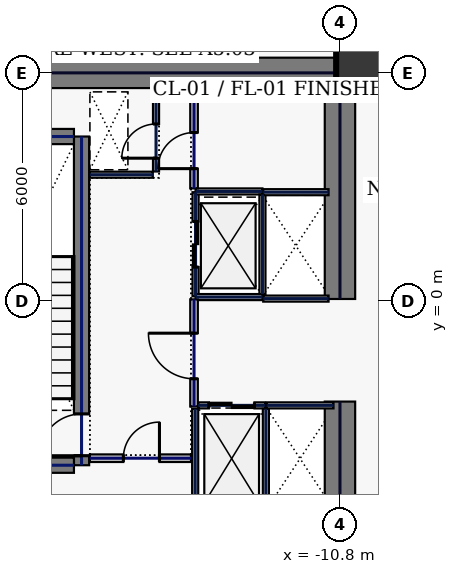
"""IFC4 building model, lengths in metres.
Left out: names, types, materials, properties, quantities, classifications, styles, units other than length and angle.
Written with IfcOpenShell. Run it as: python <this file> out.ifc"""

import sys

from ifc_helpers import new_model, si_unit, direction, frame, frame_2d, origin, origin_2d, place, context, subcontext, project, spatial, rectangle, hollow_rectangle, extrude, element, fill, save


model = new_model("IFC4")
c1 = context("Model", 3, precision=1e-05, world=origin(), true_north=direction((0.0, 1.0)))
c2 = subcontext(c1, "Body", "Model", "MODEL_VIEW")
j1 = project(units=[si_unit("LENGTHUNIT", "METRE"), si_unit("PLANEANGLEUNIT", "RADIAN")], contexts=[c1])
p1 = place(None, origin())
s1 = spatial("IfcSite", under=j1, at=p1, CompositionType="ELEMENT")
p2 = place(p1, origin())
s2 = spatial("IfcBuilding", under=s1, at=p2, CompositionType="ELEMENT")
p3 = place(p2, frame((0.0, 0.0, 67.4)))
s3 = spatial("IfcBuildingStorey", under=s2, at=p3, CompositionType="ELEMENT", Elevation=67.4)
p4 = place(p3, frame((-22.0, 6.0, 0.0), z_axis=(0.0, 0.0, 1.0), x_axis=(1.0, 0.0, 0.0)))
e1 = element("IfcWall", 1, at=p4, inside=s3, PredefinedType="SHEAR", context=c2, shape_type="SweptSolid", body=[
    extrude(rectangle(XDim=11.6, YDim=0.8, at=frame_2d((5.8, 0.0))), origin(), (0.0, 0.0, 1.0), 3.74),
])
p5 = place(p3, frame((-10.8, -5.6, 0.0), z_axis=(0.0, 0.0, 1.0), x_axis=(0.0, 1.0, 0.0)))
e2 = element("IfcWall", 2, at=p5, inside=s3, PredefinedType="SHEAR", context=c2, shape_type="SweptSolid", body=[
    extrude(rectangle(XDim=2.95, YDim=0.8, at=frame_2d((1.475, 0.0))), origin(), (0.0, 0.0, 1.0), 3.74),
])
p6 = place(p3, frame((-10.8, 0.05, 0.0), z_axis=(0.0, 0.0, 1.0), x_axis=(0.0, 1.0, 0.0)))
e3 = element("IfcWall", 3, at=p6, inside=s3, PredefinedType="SHEAR", context=c2, shape_type="SweptSolid", body=[
    extrude(rectangle(XDim=5.55, YDim=0.8, at=frame_2d((2.775, 0.0))), origin(), (0.0, 0.0, 1.0), 3.74),
])
p7 = place(p3, frame((-17.6, -4.325, 0.0), z_axis=(0.0, 0.0, 1.0), x_axis=(0.0, 1.0, 0.0)))
e4 = element("IfcWall", 4, at=p7, inside=s3, PredefinedType="SHEAR", context=c2, shape_type="SweptSolid", body=[
    extrude(rectangle(XDim=8.65, YDim=0.4, at=frame_2d((4.325, 0.0))), origin(), (0.0, 0.0, 1.0), 3.74),
])
p8 = place(p7, frame((0.25, 0.0, 0.0)))
e5 = element("IfcOpeningElement", 5, at=p8, cuts=e4, PredefinedType="OPENING", context=c2, shape_type="SweptSolid", body=[
    extrude(rectangle(XDim=1.1, YDim=2.2, at=frame_2d((0.55, 1.1))), frame((0.0, 0.21, 0.0), z_axis=(0.0, -1.0, 0.0), x_axis=(1.0, 0.0, 0.0)), (0.0, 0.0, 1.0), 0.42),
])
for number, where, z_axis, x_axis in (
    (6, (-21.2, -4.325, 0.0), (0.0, 0.0, 1.0), (1.0, 0.0, 0.0)),
    (7, (-21.2, 4.325, 0.0), (0.0, 0.0, 1.0), (1.0, 0.0, 0.0)),
):
    element("IfcWall", number, at=place(p3, frame(where, z_axis=z_axis, x_axis=x_axis)), inside=s3, PredefinedType="SHEAR", context=c2, shape_type="SweptSolid", body=[
        extrude(rectangle(XDim=3.4, YDim=0.4, at=frame_2d((1.7, 0.0))), origin(), (0.0, 0.0, 1.0), 3.74),
    ])
p9 = place(p3, frame((-10.3, 6.35, 0.0), z_axis=(0.0, 0.0, 1.0), x_axis=(1.0, 0.0, 0.0)))
e8 = element("IfcColumn", 8, at=p9, inside=s3, PredefinedType="COLUMN", context=c2, shape_type="SweptSolid", body=[
    extrude(hollow_rectangle(XDim=1.2, YDim=1.2, WallThickness=0.05, at=origin_2d()), origin(), (0.0, 0.0, 1.0), 3.74),
])
p10 = place(p3, frame((-14.6, 0.12, 0.0), z_axis=(0.0, 0.0, 1.0), x_axis=(0.0, 1.0, 0.0)))
e9 = element("IfcWall", 9, at=p10, inside=s3, PredefinedType="PARTITIONING", context=c2, shape_type="SweptSolid", body=[
    extrude(rectangle(XDim=2.74, YDim=0.16, at=frame_2d((1.37, 0.0))), origin(), (0.0, 0.0, 1.0), 3.74),
])
p11 = place(p10, frame((0.77, 0.0, 0.0)))
e10 = element("IfcOpeningElement", 10, at=p11, cuts=e9, PredefinedType="OPENING", context=c2, shape_type="SweptSolid", body=[
    extrude(rectangle(XDim=1.2, YDim=2.2, at=frame_2d((0.6, 1.1))), frame((0.0, 0.09, 0.0), z_axis=(0.0, -1.0, 0.0), x_axis=(1.0, 0.0, 0.0)), (0.0, 0.0, 1.0), 0.18),
])
for number, where, z_axis, x_axis in (
    (11, (-14.6, 0.1, 0.0), (0.0, 0.0, 1.0), (1.0, 0.0, 0.0)),
    (12, (-14.6, 2.88, 0.0), (0.0, 0.0, 1.0), (1.0, 0.0, 0.0)),
):
    element("IfcWall", number, at=place(p3, frame(where, z_axis=z_axis, x_axis=x_axis)), inside=s3, PredefinedType="PARTITIONING", context=c2, shape_type="SweptSolid", body=[
        extrude(rectangle(XDim=1.76, YDim=0.16, at=frame_2d((0.88, 0.0))), origin(), (0.0, 0.0, 1.0), 3.74),
    ])
p12 = place(p3, frame((-12.84, 0.18, 0.0), z_axis=(0.0, 0.0, 1.0), x_axis=(0.0, 1.0, 0.0)))
e13 = element("IfcWall", 13, at=p12, inside=s3, PredefinedType="PARTITIONING", context=c2, shape_type="SweptSolid", body=[
    extrude(rectangle(XDim=2.62, YDim=0.16, at=frame_2d((1.31, 0.0))), origin(), (0.0, 0.0, 1.0), 3.74),
])
p13 = place(p3, frame((-14.53, -2.75, 0.0), z_axis=(0.0, 0.0, 1.0), x_axis=(1.0, 0.0, 0.0)))
e14 = element("IfcWall", 14, at=p13, inside=s3, PredefinedType="PARTITIONING", context=c2, shape_type="SweptSolid", body=[
    extrude(rectangle(XDim=1.76, YDim=0.16, at=frame_2d((0.88, 0.0))), origin(), (0.0, 0.0, 1.0), 3.74),
])
p14 = place(p13, frame((0.28, 0.0, 0.0)))
e15 = element("IfcOpeningElement", 15, at=p14, cuts=e14, PredefinedType="OPENING", context=c2, shape_type="SweptSolid", body=[
    extrude(rectangle(XDim=1.2, YDim=2.2, at=frame_2d((0.6, 1.1))), frame((0.0, 0.09, 0.0), z_axis=(0.0, -1.0, 0.0), x_axis=(1.0, 0.0, 0.0)), (0.0, 0.0, 1.0), 0.18),
])
for number, where, z_axis, x_axis in (
    (16, (-12.75, -5.54, 0.0), (0.0, 0.0, 1.0), (0.0, 1.0, 0.0)),
    (17, (-14.61, -5.54, 0.0), (0.0, 0.0, 1.0), (0.0, 1.0, 0.0)),
):
    element("IfcWall", number, at=place(p3, frame(where, z_axis=z_axis, x_axis=x_axis)), inside=s3, PredefinedType="PARTITIONING", context=c2, shape_type="SweptSolid", body=[
        extrude(rectangle(XDim=2.7, YDim=0.16, at=frame_2d((1.35, 0.0))), origin(), (0.0, 0.0, 1.0), 3.74),
    ])
p15 = place(p3, frame((-12.73, -2.75, 0.0), z_axis=(0.0, 0.0, 1.0), x_axis=(1.0, 0.0, 0.0)))
e18 = element("IfcWall", 18, at=p15, inside=s3, PredefinedType="PARTITIONING", context=c2, shape_type="SweptSolid", body=[
    extrude(rectangle(XDim=1.76, YDim=0.16, at=frame_2d((0.88, 0.0))), origin(), (0.0, 0.0, 1.0), 3.74),
])
for number, where, z_axis, x_axis in (
    (19, (-12.82, 0.06, 0.0), (0.0, 0.0, 1.0), (1.0, 0.0, 0.0)),
    (20, (-12.82, 2.86, 0.0), (0.0, 0.0, 1.0), (1.0, 0.0, 0.0)),
):
    element("IfcWall", number, at=place(p3, frame(where, z_axis=z_axis, x_axis=x_axis)), inside=s3, PredefinedType="PARTITIONING", context=c2, shape_type="SweptSolid", body=[
        extrude(rectangle(XDim=1.72, YDim=0.16, at=frame_2d((0.86, 0.0))), origin(), (0.0, 0.0, 1.0), 3.74),
    ])
p16 = place(p3, frame((-15.64, 3.405, 0.0), z_axis=(0.0, 0.0, 1.0), x_axis=(0.0, 1.0, 0.0)))
e21 = element("IfcWall", 21, at=p16, inside=s3, PredefinedType="PARTITIONING", context=c2, shape_type="SweptSolid", body=[
    extrude(rectangle(XDim=2.155, YDim=0.16, at=frame_2d((1.078, 0.0))), origin(), (0.0, 0.0, 1.0), 3.74),
])
p17 = place(p16, frame((0.35, 0.0, 0.0)))
e22 = element("IfcOpeningElement", 22, at=p17, cuts=e21, PredefinedType="OPENING", context=c2, shape_type="SweptSolid", body=[
    extrude(rectangle(XDim=0.9, YDim=2.2, at=frame_2d((0.45, 1.1))), frame((0.0, 0.09, 0.0), z_axis=(0.0, -1.0, 0.0), x_axis=(1.0, 0.0, 0.0)), (0.0, 0.0, 1.0), 0.18),
])
p18 = place(p3, frame((-17.38, 3.32, 0.0), z_axis=(0.0, 0.0, 1.0), x_axis=(1.0, 0.0, 0.0)))
e23 = element("IfcWall", 23, at=p18, inside=s3, PredefinedType="PARTITIONING", context=c2, shape_type="SweptSolid", body=[
    extrude(rectangle(XDim=1.655, YDim=0.16, at=frame_2d((0.827, 0.0))), origin(), (0.0, 0.0, 1.0), 3.74),
])
p19 = place(p3, frame((-17.38, -4.14, 0.0), z_axis=(0.0, 0.0, 1.0), x_axis=(1.0, 0.0, 0.0)))
e24 = element("IfcWall", 24, at=p19, inside=s3, PredefinedType="SOLIDWALL", context=c2, shape_type="SweptSolid", body=[
    extrude(rectangle(XDim=2.66, YDim=0.2, at=frame_2d((1.33, 0.0))), origin(), (0.0, 0.0, 1.0), 3.74),
])
p20 = place(p19, frame((0.88, 0.0, 0.0)))
e25 = element("IfcOpeningElement", 25, at=p20, cuts=e24, PredefinedType="OPENING", context=c2, shape_type="SweptSolid", body=[
    extrude(rectangle(XDim=0.95, YDim=2.2, at=frame_2d((0.475, 1.1))), frame((0.0, 0.11, 0.0), z_axis=(0.0, -1.0, 0.0), x_axis=(1.0, 0.0, 0.0)), (0.0, 0.0, 1.0), 0.22),
])
p21 = place(p3, frame((-14.64, 2.96, 0.0), z_axis=(0.0, 0.0, 1.0), x_axis=(0.0, 1.0, 0.0)))
e26 = element("IfcWall", 26, at=p21, inside=s3, PredefinedType="SOLIDWALL", context=c2, shape_type="SweptSolid", body=[
    extrude(rectangle(XDim=2.6, YDim=0.2, at=frame_2d((1.3, 0.0))), origin(), (0.0, 0.0, 1.0), 3.74),
])
p22 = place(p21, frame((0.52, 0.0, 0.0)))
e27 = element("IfcOpeningElement", 27, at=p22, cuts=e26, PredefinedType="OPENING", context=c2, shape_type="SweptSolid", body=[
    extrude(rectangle(XDim=0.95, YDim=2.2, at=frame_2d((0.475, 1.1))), frame((0.0, 0.11, 0.0), z_axis=(0.0, -1.0, 0.0), x_axis=(1.0, 0.0, 0.0)), (0.0, 0.0, 1.0), 0.22),
])
p23 = place(p3, frame((-14.64, -2.78, 0.0), z_axis=(0.0, 0.0, 1.0), x_axis=(0.0, 1.0, 0.0)))
e28 = element("IfcWall", 28, at=p23, inside=s3, PredefinedType="SOLIDWALL", context=c2, shape_type="SweptSolid", body=[
    extrude(rectangle(XDim=2.82, YDim=0.2, at=frame_2d((1.41, 0.0))), origin(), (0.0, 0.0, 1.0), 3.74),
])
p24 = place(p23, frame((0.73, 0.0, 0.0)))
e29 = element("IfcOpeningElement", 29, at=p24, cuts=e28, PredefinedType="OPENING", context=c2, shape_type="SweptSolid", body=[
    extrude(rectangle(XDim=1.2, YDim=2.2, at=frame_2d((0.6, 1.1))), frame((0.0, 0.11, 0.0), z_axis=(0.0, -1.0, 0.0), x_axis=(1.0, 0.0, 0.0)), (0.0, 0.0, 1.0), 0.22),
])
p25 = place(p3, frame((-10.58, 6.42, 0.0), z_axis=(0.0, 0.0, 1.0), x_axis=(0.0, 1.0, 0.0)))
e30 = element("IfcWall", 30, at=p25, inside=s3, PredefinedType="PARTITIONING", context=c2, shape_type="SweptSolid", body=[
    extrude(rectangle(XDim=0.765, YDim=0.16, at=frame_2d((0.383, 0.0))), origin(), (0.0, 0.0, 1.0), 3.74),
])
p26 = place(p8, origin())
e31 = element("IfcDoor", 31, at=p26, inside=s3, OperationType="SINGLE_SWING_LEFT", PredefinedType="DOOR", context=c2, shape_type="SweptSolid", body=[
    extrude(rectangle(XDim=1.1, YDim=2.2, at=frame_2d((0.55, 1.1))), frame((0.0, 0.025, 0.0), z_axis=(0.0, -1.0, 0.0), x_axis=(1.0, 0.0, 0.0)), (0.0, 0.0, 1.0), 0.05),
])
fill(e5, e31)
p27 = place(p11, origin())
e32 = element("IfcDoor", 32, at=p27, inside=s3, OperationType="SLIDING_TO_LEFT", PredefinedType="DOOR", context=c2, shape_type="SweptSolid", body=[
    extrude(rectangle(XDim=1.2, YDim=2.2, at=frame_2d((0.6, 1.1))), frame((0.0, 0.025, 0.0), z_axis=(0.0, -1.0, 0.0), x_axis=(1.0, 0.0, 0.0)), (0.0, 0.0, 1.0), 0.05),
])
fill(e10, e32)
p28 = place(p14, origin())
e33 = element("IfcDoor", 33, at=p28, inside=s3, OperationType="SLIDING_TO_LEFT", PredefinedType="DOOR", context=c2, shape_type="SweptSolid", body=[
    extrude(rectangle(XDim=1.2, YDim=2.2, at=frame_2d((0.6, 1.1))), frame((0.0, 0.025, 0.0), z_axis=(0.0, -1.0, 0.0), x_axis=(1.0, 0.0, 0.0)), (0.0, 0.0, 1.0), 0.05),
])
fill(e15, e33)
p29 = place(p17, origin())
e34 = element("IfcDoor", 34, at=p29, inside=s3, OperationType="SINGLE_SWING_LEFT", PredefinedType="DOOR", context=c2, shape_type="SweptSolid", body=[
    extrude(rectangle(XDim=0.9, YDim=2.2, at=frame_2d((0.45, 1.1))), frame((0.0, 0.025, 0.0), z_axis=(0.0, -1.0, 0.0), x_axis=(1.0, 0.0, 0.0)), (0.0, 0.0, 1.0), 0.05),
])
fill(e22, e34)
p30 = place(p20, origin())
e35 = element("IfcDoor", 35, at=p30, inside=s3, OperationType="SINGLE_SWING_RIGHT", PredefinedType="DOOR", context=c2, shape_type="SweptSolid", body=[
    extrude(rectangle(XDim=0.95, YDim=2.2, at=frame_2d((0.475, 1.1))), frame((0.0, 0.025, 0.0), z_axis=(0.0, -1.0, 0.0), x_axis=(1.0, 0.0, 0.0)), (0.0, 0.0, 1.0), 0.05),
])
fill(e25, e35)
p31 = place(p22, origin())
e36 = element("IfcDoor", 36, at=p31, inside=s3, OperationType="SINGLE_SWING_LEFT", PredefinedType="DOOR", context=c2, shape_type="SweptSolid", body=[
    extrude(rectangle(XDim=0.95, YDim=2.2, at=frame_2d((0.475, 1.1))), frame((0.0, 0.025, 0.0), z_axis=(0.0, -1.0, 0.0), x_axis=(1.0, 0.0, 0.0)), (0.0, 0.0, 1.0), 0.05),
])
fill(e27, e36)
p32 = place(p24, origin())
e37 = element("IfcDoor", 37, at=p32, inside=s3, OperationType="SINGLE_SWING_RIGHT", PredefinedType="DOOR", context=c2, shape_type="SweptSolid", body=[
    extrude(rectangle(XDim=1.2, YDim=2.2, at=frame_2d((0.6, 1.1))), frame((0.0, 0.025, 0.0), z_axis=(0.0, -1.0, 0.0), x_axis=(1.0, 0.0, 0.0)), (0.0, 0.0, 1.0), 0.05),
])
fill(e29, e37)
save(model, sys.argv[1])
